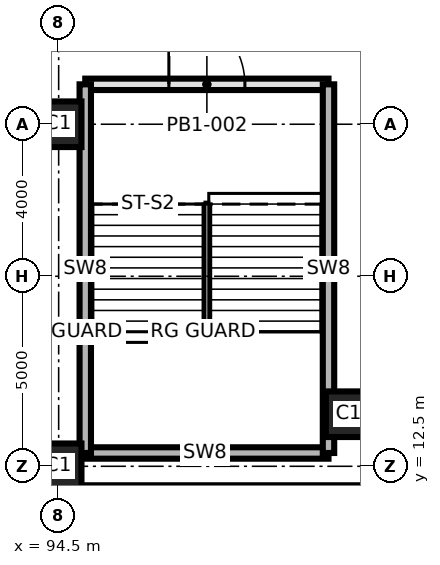
"""IFC4 building model, lengths in metres.
Left out: names, types, materials, properties, quantities, classifications, styles, units other than length and angle.
Written with IfcOpenShell. Run it as: python <this file> out.ifc"""

import sys

from ifc_helpers import new_model, si_unit, direction, frame, frame_2d, origin, origin_2d, place, context, subcontext, project, spatial, rectangle, extrude, element, fill, save


model = new_model("IFC4")
c1 = context("Model", 3, precision=1e-05, world=origin(), true_north=direction((0.0, 1.0)))
c2 = subcontext(c1, "Body", "Model", "MODEL_VIEW")
j1 = project(units=[si_unit("LENGTHUNIT", "METRE"), si_unit("PLANEANGLEUNIT", "RADIAN")], contexts=[c1])
p1 = place(None, origin())
s1 = spatial("IfcSite", under=j1, at=p1, CompositionType="ELEMENT")
p2 = place(p1, origin())
s2 = spatial("IfcBuilding", under=s1, at=p2, CompositionType="ELEMENT")
p3 = place(p2, frame((0.0, 0.0, -4.5)))
s3 = spatial("IfcBuildingStorey", under=s2, at=p3, CompositionType="ELEMENT", Elevation=-4.5)
for number, where, z_axis, x_axis in (
    (1, (94.5, 12.5, 0.0), (0.0, 0.0, 1.0), (1.0, 0.0, 0.0)),
    (2, (102.13, 13.87, 0.0), (0.0, 0.0, 1.0), (1.0, 0.0, 0.0)),
    (3, (94.5, 21.5, 0.0), (0.0, 0.0, 1.0), (1.0, 0.0, 0.0)),
):
    element("IfcColumn", number, at=place(p3, frame(where, z_axis=z_axis, x_axis=x_axis)), inside=s3, PredefinedType="COLUMN", context=c2, shape_type="SweptSolid", body=[
        extrude(rectangle(XDim=1.2, YDim=1.2, at=origin_2d()), origin(), (0.0, 0.0, 1.0), 4.5),
    ])
p4 = place(p3, frame((95.1, 12.85, 0.0), z_axis=(0.0, 0.0, 1.0), x_axis=(1.0, 0.0, 0.0)))
e4 = element("IfcWall", 4, at=p4, inside=s3, PredefinedType="SHEAR", context=c2, shape_type="SweptSolid", body=[
    extrude(rectangle(XDim=6.5, YDim=0.3, at=frame_2d((3.25, 0.0))), origin(), (0.0, 0.0, 1.0), 4.2),
])
p5 = place(p3, frame((95.2, 22.55, 0.0), z_axis=(0.0, 0.0, 1.0), x_axis=(1.0, 0.0, 0.0)))
e5 = element("IfcWall", 5, at=p5, inside=s3, PredefinedType="SOLIDWALL", context=c2, shape_type="SweptSolid", body=[
    extrude(rectangle(XDim=6.4, YDim=0.3, at=frame_2d((3.2, 0.0))), origin(), (0.0, 0.0, 1.0), 4.2),
])
p6 = place(p5, frame((2.2, 0.0, 0.0)))
e6 = element("IfcOpeningElement", 6, at=p6, cuts=e5, PredefinedType="OPENING", context=c2, shape_type="SweptSolid", body=[
    extrude(rectangle(XDim=2.0, YDim=2.1, at=frame_2d((1.0, 1.05))), frame((0.0, 0.16, 0.0), z_axis=(0.0, -1.0, 0.0), x_axis=(1.0, 0.0, 0.0)), (0.0, 0.0, 1.0), 0.32),
])
for number, where, z_axis, x_axis in (
    (7, (101.6, 12.85, 0.0), (0.0, 0.0, 1.0), (0.0, 1.0, 0.0)),
    (8, (95.2, 12.85, 0.0), (0.0, 0.0, 1.0), (0.0, 1.0, 0.0)),
):
    element("IfcWall", number, at=place(p3, frame(where, z_axis=z_axis, x_axis=x_axis)), inside=s3, PredefinedType="SHEAR", context=c2, shape_type="SweptSolid", body=[
        extrude(rectangle(XDim=9.7, YDim=0.3, at=frame_2d((4.85, 0.0))), origin(), (0.0, 0.0, 1.0), 4.2),
    ])
p7 = place(p6, origin())
e9 = element("IfcDoor", 9, at=p7, inside=s3, OperationType="SINGLE_SWING_RIGHT", PredefinedType="DOOR", context=c2, shape_type="SweptSolid", body=[
    extrude(rectangle(XDim=2.0, YDim=2.1, at=frame_2d((1.0, 1.05))), frame((0.0, 0.025, 0.0), z_axis=(0.0, -1.0, 0.0), x_axis=(1.0, 0.0, 0.0)), (0.0, 0.0, 1.0), 0.05),
])
fill(e6, e9)
save(model, sys.argv[1])
